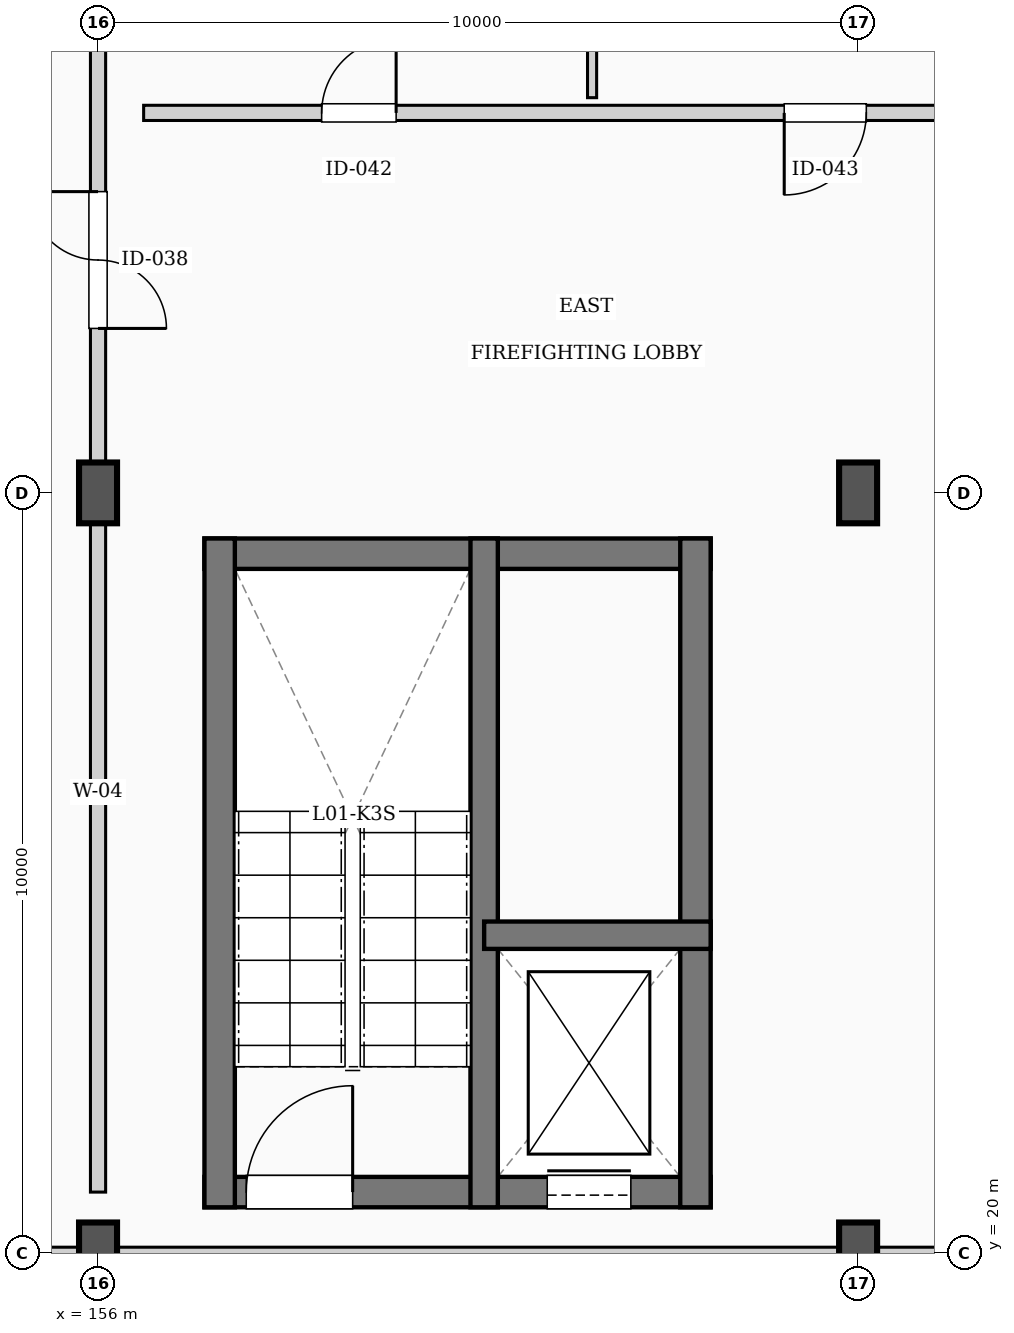
"""IFC4 building model, lengths in metres.
Left out: names, types, materials, properties, quantities, classifications, styles, units other than length and angle.
Written with IfcOpenShell. Run it as: python <this file> out.ifc"""

import sys

from ifc_helpers import new_model, si_unit, direction, frame, frame_2d, origin, origin_2d, place, context, subcontext, project, spatial, rectangle, extrude, element, fill, save


model = new_model("IFC4")
c1 = context("Model", 3, precision=1e-05, world=origin(), true_north=direction((0.0, 1.0)))
c2 = subcontext(c1, "Body", "Model", "MODEL_VIEW")
j1 = project(units=[si_unit("LENGTHUNIT", "METRE"), si_unit("PLANEANGLEUNIT", "RADIAN")], contexts=[c1])
p1 = place(None, origin())
s1 = spatial("IfcSite", under=j1, at=p1, CompositionType="ELEMENT")
p2 = place(p1, origin())
s2 = spatial("IfcBuilding", under=s1, at=p2, CompositionType="ELEMENT")
p3 = place(p2, frame((0.0, 0.0, 5.4)))
s3 = spatial("IfcBuildingStorey", under=s2, at=p3, CompositionType="ELEMENT", Elevation=5.4)
for number, where, z_axis, x_axis in (
    (1, (156.0, 20.0, 0.0), (0.0, 0.0, 1.0), (1.0, 0.0, 0.0)),
    (2, (156.0, 30.0, 0.0), (0.0, 0.0, 1.0), (1.0, 0.0, 0.0)),
    (3, (166.0, 20.0, 0.0), (0.0, 0.0, 1.0), (1.0, 0.0, 0.0)),
    (4, (166.0, 30.0, 0.0), (0.0, 0.0, 1.0), (1.0, 0.0, 0.0)),
):
    element("IfcColumn", number, at=place(p3, frame(where, z_axis=z_axis, x_axis=x_axis)), inside=s3, PredefinedType="COLUMN", context=c2, shape_type="SweptSolid", body=[
        extrude(rectangle(XDim=0.5, YDim=0.8, at=origin_2d()), origin(), (0.0, 0.0, 1.0), 4.8),
    ])
p4 = place(p3, frame((157.4, 20.8, 0.0), z_axis=(0.0, 0.0, 1.0), x_axis=(1.0, 0.0, 0.0)))
e5 = element("IfcWall", 5, at=p4, inside=s3, PredefinedType="SHEAR", context=c2, shape_type="SweptSolid", body=[
    extrude(rectangle(XDim=6.66, YDim=0.4, at=frame_2d((3.33, 0.0))), origin(), (0.0, 0.0, 1.0), 4.8),
])
p5 = place(p4, frame((0.55, 0.0, 0.0)))
e6 = element("IfcOpeningElement", 6, at=p5, cuts=e5, PredefinedType="OPENING", context=c2, shape_type="SweptSolid", body=[
    extrude(rectangle(XDim=1.4, YDim=2.35, at=frame_2d((0.7, 1.175))), frame((0.0, 0.21, 0.0), z_axis=(0.0, -1.0, 0.0), x_axis=(1.0, 0.0, 0.0)), (0.0, 0.0, 1.0), 0.42),
])
p6 = place(p4, frame((4.51, 0.0, 0.0)))
e7 = element("IfcOpeningElement", 7, at=p6, cuts=e5, PredefinedType="OPENING", context=c2, shape_type="SweptSolid", body=[
    extrude(rectangle(XDim=1.1, YDim=2.3, at=frame_2d((0.55, 1.15))), frame((0.0, 0.21, 0.0), z_axis=(0.0, -1.0, 0.0), x_axis=(1.0, 0.0, 0.0)), (0.0, 0.0, 1.0), 0.42),
])
p7 = place(p3, frame((157.4, 29.2, 0.0), z_axis=(0.0, 0.0, 1.0), x_axis=(1.0, 0.0, 0.0)))
e8 = element("IfcWall", 8, at=p7, inside=s3, PredefinedType="SHEAR", context=c2, shape_type="SweptSolid", body=[
    extrude(rectangle(XDim=6.66, YDim=0.4, at=frame_2d((3.33, 0.0))), origin(), (0.0, 0.0, 1.0), 4.8),
])
for number, where, z_axis, x_axis in (
    (9, (157.6, 20.6, 0.0), (0.0, 0.0, 1.0), (0.0, 1.0, 0.0)),
    (10, (163.86, 20.6, 0.0), (0.0, 0.0, 1.0), (0.0, 1.0, 0.0)),
):
    element("IfcWall", number, at=place(p3, frame(where, z_axis=z_axis, x_axis=x_axis)), inside=s3, PredefinedType="SHEAR", context=c2, shape_type="SweptSolid", body=[
        extrude(rectangle(XDim=8.8, YDim=0.4, at=frame_2d((4.4, 0.0))), origin(), (0.0, 0.0, 1.0), 4.8),
    ])
p8 = place(p3, frame((161.08, 20.6, 0.0), z_axis=(0.0, 0.0, 1.0), x_axis=(0.0, 1.0, 0.0)))
e11 = element("IfcWall", 11, at=p8, inside=s3, PredefinedType="SHEAR", context=c2, shape_type="SweptSolid", body=[
    extrude(rectangle(XDim=8.8, YDim=0.36, at=frame_2d((4.4, 0.0))), origin(), (0.0, 0.0, 1.0), 4.8),
])
p9 = place(p3, frame((161.08, 24.18, 0.0), z_axis=(0.0, 0.0, 1.0), x_axis=(1.0, 0.0, 0.0)))
e12 = element("IfcWall", 12, at=p9, inside=s3, PredefinedType="SHEAR", context=c2, shape_type="SweptSolid", body=[
    extrude(rectangle(XDim=2.98, YDim=0.36, at=frame_2d((1.49, 0.0))), origin(), (0.0, 0.0, 1.0), 4.8),
])
p10 = place(p3, frame((156.0, 20.8, 0.0), z_axis=(0.0, 0.0, 1.0), x_axis=(0.0, 1.0, 0.0)))
e13 = element("IfcWall", 13, at=p10, inside=s3, PredefinedType="PARTITIONING", context=c2, shape_type="SweptSolid", body=[
    extrude(rectangle(XDim=58.4, YDim=0.2, at=frame_2d((29.2, 0.0))), origin(), (0.0, 0.0, 1.0), 4.23),
])
p11 = place(p10, frame((11.364, 0.0, 0.0)))
e14 = element("IfcOpeningElement", 14, at=p11, cuts=e13, PredefinedType="OPENING", context=c2, shape_type="SweptSolid", body=[
    extrude(rectangle(XDim=1.8, YDim=2.45, at=frame_2d((0.9, 1.225))), frame((0.0, 0.11, 0.0), z_axis=(0.0, -1.0, 0.0), x_axis=(1.0, 0.0, 0.0)), (0.0, 0.0, 1.0), 0.22),
])
p12 = place(p10, frame((23.328, 0.0, 0.0)))
e15 = element("IfcOpeningElement", 15, at=p12, cuts=e13, PredefinedType="OPENING", context=c2, shape_type="SweptSolid", body=[
    extrude(rectangle(XDim=2.4, YDim=2.6, at=frame_2d((1.2, 1.3))), frame((0.0, 0.11, 0.0), z_axis=(0.0, -1.0, 0.0), x_axis=(1.0, 0.0, 0.0)), (0.0, 0.0, 1.0), 0.22),
])
p13 = place(p10, frame((44.452, 0.0, 0.0)))
e16 = element("IfcOpeningElement", 16, at=p13, cuts=e13, PredefinedType="OPENING", context=c2, shape_type="SweptSolid", body=[
    extrude(rectangle(XDim=2.2, YDim=2.5, at=frame_2d((1.1, 1.25))), frame((0.0, 0.11, 0.0), z_axis=(0.0, -1.0, 0.0), x_axis=(1.0, 0.0, 0.0)), (0.0, 0.0, 1.0), 0.22),
])
p14 = place(p3, frame((146.8, 20.0, 0.0), z_axis=(0.0, 0.0, 1.0), x_axis=(1.0, 0.0, 0.0)))
e17 = element("IfcWall", 17, at=p14, inside=s3, PredefinedType="PARTITIONING", context=c2, shape_type="SweptSolid", body=[
    extrude(rectangle(XDim=28.4, YDim=0.15, at=frame_2d((14.2, 0.0))), origin(), (0.0, 0.0, 1.0), 3.97),
])
p15 = place(p14, frame((4.012, 0.0, 0.0)))
e18 = element("IfcOpeningElement", 18, at=p15, cuts=e17, PredefinedType="OPENING", context=c2, shape_type="SweptSolid", body=[
    extrude(rectangle(XDim=2.2, YDim=2.5, at=frame_2d((1.1, 1.25))), frame((0.0, 0.085, 0.0), z_axis=(0.0, -1.0, 0.0), x_axis=(1.0, 0.0, 0.0)), (0.0, 0.0, 1.0), 0.17),
])
p16 = place(p3, frame((156.6, 35.0, 0.0), z_axis=(0.0, 0.0, 1.0), x_axis=(1.0, 0.0, 0.0)))
e19 = element("IfcWall", 19, at=p16, inside=s3, PredefinedType="PARTITIONING", context=c2, shape_type="SweptSolid", body=[
    extrude(rectangle(XDim=11.8, YDim=0.2, at=frame_2d((5.9, 0.0))), origin(), (0.0, 0.0, 1.0), 4.46),
])
p17 = place(p16, frame((2.342, 0.0, 0.0)))
e20 = element("IfcOpeningElement", 20, at=p17, cuts=e19, PredefinedType="OPENING", context=c2, shape_type="SweptSolid", body=[
    extrude(rectangle(XDim=0.98, YDim=2.3, at=frame_2d((0.49, 1.15))), frame((0.0, 0.11, 0.0), z_axis=(0.0, -1.0, 0.0), x_axis=(1.0, 0.0, 0.0)), (0.0, 0.0, 1.0), 0.22),
])
p18 = place(p16, frame((8.428, 0.0, 0.0)))
e21 = element("IfcOpeningElement", 21, at=p18, cuts=e19, PredefinedType="OPENING", context=c2, shape_type="SweptSolid", body=[
    extrude(rectangle(XDim=1.08, YDim=2.35, at=frame_2d((0.54, 1.175))), frame((0.0, 0.11, 0.0), z_axis=(0.0, -1.0, 0.0), x_axis=(1.0, 0.0, 0.0)), (0.0, 0.0, 1.0), 0.22),
])
p19 = place(p3, frame((162.5, 35.2, 0.0), z_axis=(0.0, 0.0, 1.0), x_axis=(0.0, 1.0, 0.0)))
e22 = element("IfcWall", 22, at=p19, inside=s3, PredefinedType="PARTITIONING", context=c2, shape_type="SweptSolid", body=[
    extrude(rectangle(XDim=4.6, YDim=0.12, at=frame_2d((2.3, 0.0))), origin(), (0.0, 0.0, 1.0), 4.46),
])
p20 = place(p5, origin())
e23 = element("IfcDoor", 23, at=p20, inside=s3, OperationType="SINGLE_SWING_RIGHT", PredefinedType="DOOR", context=c2, shape_type="SweptSolid", body=[
    extrude(rectangle(XDim=1.4, YDim=2.35, at=frame_2d((0.7, 1.175))), frame((0.0, 0.025, 0.0), z_axis=(0.0, -1.0, 0.0), x_axis=(1.0, 0.0, 0.0)), (0.0, 0.0, 1.0), 0.05),
])
fill(e6, e23)
p21 = place(p6, origin())
e24 = element("IfcDoor", 24, at=p21, inside=s3, OperationType="SLIDING_TO_LEFT", PredefinedType="DOOR", context=c2, shape_type="SweptSolid", body=[
    extrude(rectangle(XDim=1.1, YDim=2.3, at=frame_2d((0.55, 1.15))), frame((0.0, 0.025, 0.0), z_axis=(0.0, -1.0, 0.0), x_axis=(1.0, 0.0, 0.0)), (0.0, 0.0, 1.0), 0.05),
])
fill(e7, e24)
p22 = place(p11, origin())
e25 = element("IfcDoor", 25, at=p22, inside=s3, OperationType="DOUBLE_DOOR_SINGLE_SWING", PredefinedType="DOOR", context=c2, shape_type="SweptSolid", body=[
    extrude(rectangle(XDim=1.8, YDim=2.45, at=frame_2d((0.9, 1.225))), frame((0.0, 0.025, 0.0), z_axis=(0.0, -1.0, 0.0), x_axis=(1.0, 0.0, 0.0)), (0.0, 0.0, 1.0), 0.05),
])
fill(e14, e25)
p23 = place(p17, origin())
e26 = element("IfcDoor", 26, at=p23, inside=s3, OperationType="SINGLE_SWING_RIGHT", PredefinedType="DOOR", context=c2, shape_type="SweptSolid", body=[
    extrude(rectangle(XDim=0.98, YDim=2.3, at=frame_2d((0.49, 1.15))), frame((0.0, 0.025, 0.0), z_axis=(0.0, -1.0, 0.0), x_axis=(1.0, 0.0, 0.0)), (0.0, 0.0, 1.0), 0.05),
])
fill(e20, e26)
p24 = place(p18, origin())
e27 = element("IfcDoor", 27, at=p24, inside=s3, OperationType="SINGLE_SWING_LEFT", PredefinedType="DOOR", context=c2, shape_type="SweptSolid", body=[
    extrude(rectangle(XDim=1.08, YDim=2.35, at=frame_2d((0.54, 1.175))), frame((0.0, 0.025, 0.0), z_axis=(0.0, -1.0, 0.0), x_axis=(1.0, 0.0, 0.0)), (0.0, 0.0, 1.0), 0.05),
])
fill(e21, e27)
save(model, sys.argv[1])
